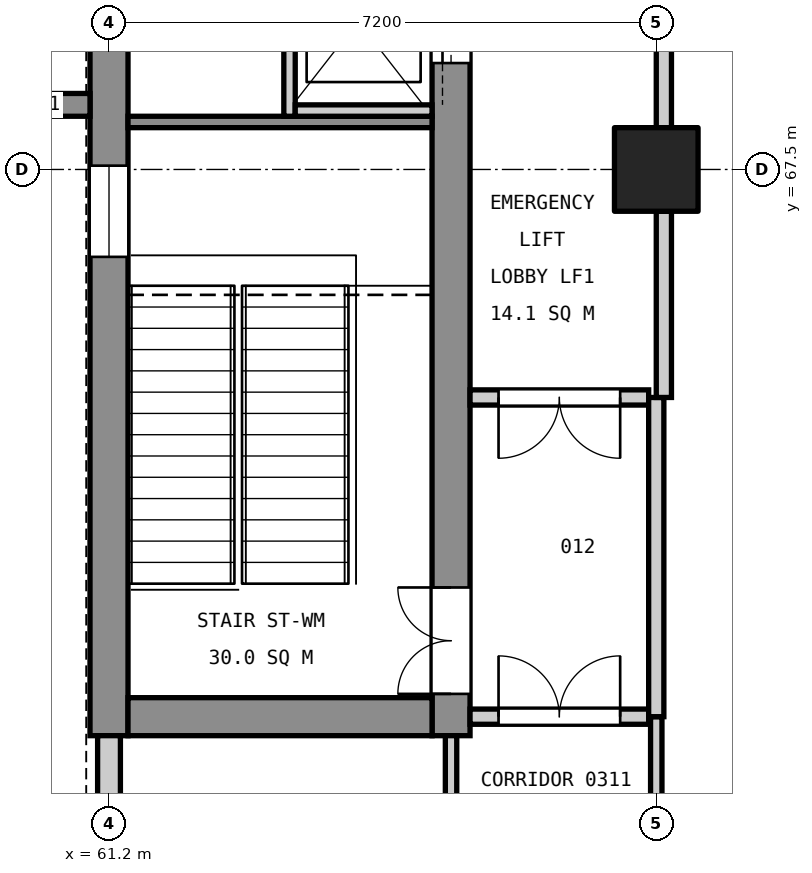
"""IFC4 building model, lengths in metres.
Left out: names, types, materials, properties, quantities, classifications, styles, units other than length and angle.
Written with IfcOpenShell. Run it as: python <this file> out.ifc"""

import sys

from ifc_helpers import new_model, si_unit, direction, frame, frame_2d, origin, origin_2d, place, context, subcontext, project, spatial, rectangle, extrude, element, fill, save


model = new_model("IFC4")
c1 = context("Model", 3, precision=1e-05, world=origin(), true_north=direction((0.0, 1.0)))
c2 = subcontext(c1, "Body", "Model", "MODEL_VIEW")
j1 = project(units=[si_unit("LENGTHUNIT", "METRE"), si_unit("PLANEANGLEUNIT", "RADIAN")], contexts=[c1])
p1 = place(None, origin())
s1 = spatial("IfcSite", under=j1, at=p1, CompositionType="ELEMENT")
p2 = place(p1, origin())
s2 = spatial("IfcBuilding", under=s1, at=p2, CompositionType="ELEMENT")
p3 = place(p2, frame((0.0, 0.0, 16.8)))
s3 = spatial("IfcBuildingStorey", under=s2, at=p3, CompositionType="ELEMENT", Elevation=16.8)
p4 = place(p3, frame((68.4, 67.5, 0.0), z_axis=(0.0, 0.0, 1.0), x_axis=(1.0, 0.0, 0.0)))
e1 = element("IfcColumn", 1, at=p4, inside=s3, PredefinedType="COLUMN", context=c2, shape_type="SweptSolid", body=[
    extrude(rectangle(XDim=1.1, YDim=1.1, at=origin_2d()), origin(), (0.0, 0.0, 1.0), 5.4),
])
p5 = place(p3, frame((61.2, 60.05, 0.0), z_axis=(0.0, 0.0, 1.0), x_axis=(0.0, 1.0, 0.0)))
e2 = element("IfcWall", 2, at=p5, inside=s3, PredefinedType="SHEAR", context=c2, shape_type="SweptSolid", body=[
    extrude(rectangle(XDim=14.9, YDim=0.5, at=frame_2d((7.45, 0.0))), origin(), (0.0, 0.0, 1.0), 5.15),
])
p6 = place(p5, frame((6.3, 0.0, 3.4)))
e3 = element("IfcOpeningElement", 3, at=p6, cuts=e2, PredefinedType="OPENING", context=c2, shape_type="SweptSolid", body=[
    extrude(rectangle(XDim=1.2, YDim=0.9, at=frame_2d((0.6, 0.45))), frame((0.0, 0.26, 0.0), z_axis=(0.0, -1.0, 0.0), x_axis=(1.0, 0.0, 0.0)), (0.0, 0.0, 1.0), 0.52),
])
p7 = place(p3, frame((65.7, 60.05, 0.0), z_axis=(0.0, 0.0, 1.0), x_axis=(0.0, 1.0, 0.0)))
e4 = element("IfcWall", 4, at=p7, inside=s3, PredefinedType="SHEAR", context=c2, shape_type="SweptSolid", body=[
    extrude(rectangle(XDim=14.9, YDim=0.5, at=frame_2d((7.45, 0.0))), origin(), (0.0, 0.0, 1.0), 5.15),
])
p8 = place(p7, frame((0.55, 0.0, 0.0)))
e5 = element("IfcOpeningElement", 5, at=p8, cuts=e4, PredefinedType="OPENING", context=c2, shape_type="SweptSolid", body=[
    extrude(rectangle(XDim=1.4, YDim=2.1, at=frame_2d((0.7, 1.05))), frame((0.0, 0.26, 0.0), z_axis=(0.0, -1.0, 0.0), x_axis=(1.0, 0.0, 0.0)), (0.0, 0.0, 1.0), 0.52),
])
p9 = place(p7, frame((8.85, 0.0, 0.0)))
e6 = element("IfcOpeningElement", 6, at=p9, cuts=e4, PredefinedType="OPENING", context=c2, shape_type="SweptSolid", body=[
    extrude(rectangle(XDim=1.1, YDim=2.1, at=frame_2d((0.55, 1.05))), frame((0.0, 0.26, 0.0), z_axis=(0.0, -1.0, 0.0), x_axis=(1.0, 0.0, 0.0)), (0.0, 0.0, 1.0), 0.52),
])
p10 = place(p7, frame((11.4, 0.0, 0.0)))
e7 = element("IfcOpeningElement", 7, at=p10, cuts=e4, PredefinedType="OPENING", context=c2, shape_type="SweptSolid", body=[
    extrude(rectangle(XDim=1.1, YDim=2.1, at=frame_2d((0.55, 1.05))), frame((0.0, 0.26, 0.0), z_axis=(0.0, -1.0, 0.0), x_axis=(1.0, 0.0, 0.0)), (0.0, 0.0, 1.0), 0.52),
])
p11 = place(p3, frame((61.45, 60.3, 0.0), z_axis=(0.0, 0.0, 1.0), x_axis=(1.0, 0.0, 0.0)))
e8 = element("IfcWall", 8, at=p11, inside=s3, PredefinedType="SHEAR", context=c2, shape_type="SweptSolid", body=[
    extrude(rectangle(XDim=4.0, YDim=0.5, at=frame_2d((2.0, 0.0))), origin(), (0.0, 0.0, 1.0), 5.15),
])
p12 = place(p3, frame((60.95, 68.35, 0.0), z_axis=(0.0, 0.0, 1.0), x_axis=(-1.0, 0.0, 0.0)))
e9 = element("IfcWall", 9, at=p12, inside=s3, PredefinedType="SHEAR", context=c2, shape_type="SweptSolid", body=[
    extrude(rectangle(XDim=1.25, YDim=0.3, at=frame_2d((0.625, 0.0))), origin(), (0.0, 0.0, 1.0), 5.4),
])
p13 = place(p3, frame((61.45, 68.125, 0.0), z_axis=(0.0, 0.0, 1.0), x_axis=(1.0, 0.0, 0.0)))
e10 = element("IfcWall", 10, at=p13, inside=s3, PredefinedType="SOLIDWALL", context=c2, shape_type="SweptSolid", body=[
    extrude(rectangle(XDim=4.0, YDim=0.15, at=frame_2d((2.0, 0.0))), origin(), (0.0, 0.0, 1.0), 5.15),
])
p14 = place(p3, frame((63.575, 68.2, 0.0), z_axis=(0.0, 0.0, 1.0), x_axis=(0.0, 1.0, 0.0)))
e11 = element("IfcWall", 11, at=p14, inside=s3, PredefinedType="SOLIDWALL", context=c2, shape_type="SweptSolid", body=[
    extrude(rectangle(XDim=2.5, YDim=0.15, at=frame_2d((1.25, 0.0))), origin(), (0.0, 0.0, 1.0), 5.4),
])
p15 = place(p3, frame((63.65, 68.275, 0.0), z_axis=(0.0, 0.0, 1.0), x_axis=(1.0, 0.0, 0.0)))
e12 = element("IfcWall", 12, at=p15, inside=s3, PredefinedType="SOLIDWALL", context=c2, shape_type="SweptSolid", body=[
    extrude(rectangle(XDim=1.8, YDim=0.15, at=frame_2d((0.9, 0.0))), origin(), (0.0, 0.0, 1.0), 5.4),
])
p16 = place(p3, frame((61.2, 57.25, 0.0), z_axis=(0.0, 0.0, 1.0), x_axis=(0.0, 1.0, 0.0)))
e13 = element("IfcWall", 13, at=p16, inside=s3, PredefinedType="STANDARD", context=c2, shape_type="SweptSolid", body=[
    extrude(rectangle(XDim=2.8, YDim=0.3, at=frame_2d((1.4, 0.0))), origin(), (0.0, 0.0, 1.0), 4.25),
])
p17 = place(p16, frame((1.025, 0.0, 0.8)))
e14 = element("IfcOpeningElement", 14, at=p17, cuts=e13, PredefinedType="OPENING", context=c2, shape_type="SweptSolid", body=[
    extrude(rectangle(XDim=0.75, YDim=1.2, at=frame_2d((0.375, 0.6))), frame((0.0, 0.16, 0.0), z_axis=(0.0, -1.0, 0.0), x_axis=(1.0, 0.0, 0.0)), (0.0, 0.0, 1.0), 0.32),
])
p18 = place(p3, frame((65.7, 56.85, 0.0), z_axis=(0.0, 0.0, 1.0), x_axis=(0.0, 1.0, 0.0)))
e15 = element("IfcWall", 15, at=p18, inside=s3, PredefinedType="PARTITIONING", context=c2, shape_type="SweptSolid", body=[
    extrude(rectangle(XDim=3.2, YDim=0.15, at=frame_2d((1.6, 0.0))), origin(), (0.0, 0.0, 1.0), 4.05),
])
p19 = place(p18, frame((1.15, 0.0, 0.0)))
e16 = element("IfcOpeningElement", 16, at=p19, cuts=e15, PredefinedType="OPENING", context=c2, shape_type="SweptSolid", body=[
    extrude(rectangle(XDim=1.0, YDim=2.1, at=frame_2d((0.5, 1.05))), frame((0.0, 0.085, 0.0), z_axis=(0.0, -1.0, 0.0), x_axis=(1.0, 0.0, 0.0)), (0.0, 0.0, 1.0), 0.17),
])
p20 = place(p3, frame((65.95, 60.3, 0.0), z_axis=(0.0, 0.0, 1.0), x_axis=(1.0, 0.0, 0.0)))
e17 = element("IfcWall", 17, at=p20, inside=s3, PredefinedType="PARTITIONING", context=c2, shape_type="SweptSolid", body=[
    extrude(rectangle(XDim=2.35, YDim=0.2, at=frame_2d((1.175, 0.0))), origin(), (0.0, 0.0, 1.0), 4.05),
])
p21 = place(p20, frame((0.375, 0.0, 0.0)))
e18 = element("IfcOpeningElement", 18, at=p21, cuts=e17, PredefinedType="OPENING", context=c2, shape_type="SweptSolid", body=[
    extrude(rectangle(XDim=1.6, YDim=2.1, at=frame_2d((0.8, 1.05))), frame((0.0, 0.11, 0.0), z_axis=(0.0, -1.0, 0.0), x_axis=(1.0, 0.0, 0.0)), (0.0, 0.0, 1.0), 0.22),
])
p22 = place(p3, frame((65.95, 64.5, 0.0), z_axis=(0.0, 0.0, 1.0), x_axis=(1.0, 0.0, 0.0)))
e19 = element("IfcWall", 19, at=p22, inside=s3, PredefinedType="PARTITIONING", context=c2, shape_type="SweptSolid", body=[
    extrude(rectangle(XDim=2.35, YDim=0.2, at=frame_2d((1.175, 0.0))), origin(), (0.0, 0.0, 1.0), 4.05),
])
p23 = place(p22, frame((0.375, 0.0, 0.0)))
e20 = element("IfcOpeningElement", 20, at=p23, cuts=e19, PredefinedType="OPENING", context=c2, shape_type="SweptSolid", body=[
    extrude(rectangle(XDim=1.6, YDim=2.1, at=frame_2d((0.8, 1.05))), frame((0.0, 0.11, 0.0), z_axis=(0.0, -1.0, 0.0), x_axis=(1.0, 0.0, 0.0)), (0.0, 0.0, 1.0), 0.22),
])
p24 = place(p3, frame((68.4, 57.25, 0.0), z_axis=(0.0, 0.0, 1.0), x_axis=(0.0, 1.0, 0.0)))
e21 = element("IfcWall", 21, at=p24, inside=s3, PredefinedType="PARTITIONING", context=c2, shape_type="SweptSolid", body=[
    extrude(rectangle(XDim=3.05, YDim=0.15, at=frame_2d((1.525, 0.0))), origin(), (0.0, 0.0, 1.0), 4.15),
])
p25 = place(p3, frame((68.4, 60.3, 0.0), z_axis=(0.0, 0.0, 1.0), x_axis=(0.0, 1.0, 0.0)))
e22 = element("IfcWall", 22, at=p25, inside=s3, PredefinedType="PARTITIONING", context=c2, shape_type="SweptSolid", body=[
    extrude(rectangle(XDim=4.2, YDim=0.2, at=frame_2d((2.1, 0.0))), origin(), (0.0, 0.0, 1.0), 4.15),
])
p26 = place(p3, frame((68.5, 64.5, 0.0), z_axis=(0.0, 0.0, 1.0), x_axis=(0.0, 1.0, 0.0)))
e23 = element("IfcWall", 23, at=p26, inside=s3, PredefinedType="PARTITIONING", context=c2, shape_type="SweptSolid", body=[
    extrude(rectangle(XDim=2.45, YDim=0.2, at=frame_2d((1.225, 0.0))), origin(), (0.0, 0.0, 1.0), 4.15),
])
p27 = place(p3, frame((68.5, 68.05, 0.0), z_axis=(0.0, 0.0, 1.0), x_axis=(0.0, 1.0, 0.0)))
e24 = element("IfcWall", 24, at=p27, inside=s3, PredefinedType="PARTITIONING", context=c2, shape_type="SweptSolid", body=[
    extrude(rectangle(XDim=2.75, YDim=0.2, at=frame_2d((1.375, 0.0))), origin(), (0.0, 0.0, 1.0), 4.15),
])
p28 = place(p8, origin())
e25 = element("IfcDoor", 25, at=p28, inside=s3, OperationType="DOUBLE_DOOR_SINGLE_SWING", PredefinedType="DOOR", context=c2, shape_type="SweptSolid", body=[
    extrude(rectangle(XDim=1.4, YDim=2.1, at=frame_2d((0.7, 1.05))), frame((0.0, 0.025, 0.0), z_axis=(0.0, -1.0, 0.0), x_axis=(1.0, 0.0, 0.0)), (0.0, 0.0, 1.0), 0.05),
])
fill(e5, e25)
p29 = place(p9, origin())
e26 = element("IfcDoor", 26, at=p29, inside=s3, OperationType="SLIDING_TO_LEFT", PredefinedType="DOOR", context=c2, shape_type="SweptSolid", body=[
    extrude(rectangle(XDim=1.1, YDim=2.1, at=frame_2d((0.55, 1.05))), frame((0.0, 0.025, 0.0), z_axis=(0.0, -1.0, 0.0), x_axis=(1.0, 0.0, 0.0)), (0.0, 0.0, 1.0), 0.05),
])
fill(e6, e26)
p30 = place(p6, origin())
e27 = element("IfcWindow", 27, at=p30, inside=s3, PartitioningType="SINGLE_PANEL", PredefinedType="WINDOW", context=c2, shape_type="SweptSolid", body=[
    extrude(rectangle(XDim=1.2, YDim=0.9, at=frame_2d((0.6, 0.45))), frame((0.0, 0.03, 0.0), z_axis=(0.0, -1.0, 0.0), x_axis=(1.0, 0.0, 0.0)), (0.0, 0.0, 1.0), 0.06),
])
fill(e3, e27)
p31 = place(p21, origin())
e28 = element("IfcDoor", 28, at=p31, inside=s3, OperationType="DOUBLE_DOOR_SINGLE_SWING", PredefinedType="DOOR", context=c2, shape_type="SweptSolid", body=[
    extrude(rectangle(XDim=1.6, YDim=2.1, at=frame_2d((0.8, 1.05))), frame((0.0, 0.025, 0.0), z_axis=(0.0, -1.0, 0.0), x_axis=(1.0, 0.0, 0.0)), (0.0, 0.0, 1.0), 0.05),
])
fill(e18, e28)
p32 = place(p23, frame((1.6, 0.0, 0.0), z_axis=(0.0, 0.0, 1.0), x_axis=(-1.0, 0.0, 0.0)))
e29 = element("IfcDoor", 29, at=p32, inside=s3, OperationType="DOUBLE_DOOR_SINGLE_SWING", PredefinedType="DOOR", context=c2, shape_type="SweptSolid", body=[
    extrude(rectangle(XDim=1.6, YDim=2.1, at=frame_2d((0.8, 1.05))), frame((0.0, 0.025, 0.0), z_axis=(0.0, -1.0, 0.0), x_axis=(1.0, 0.0, 0.0)), (0.0, 0.0, 1.0), 0.05),
])
fill(e20, e29)
save(model, sys.argv[1])
